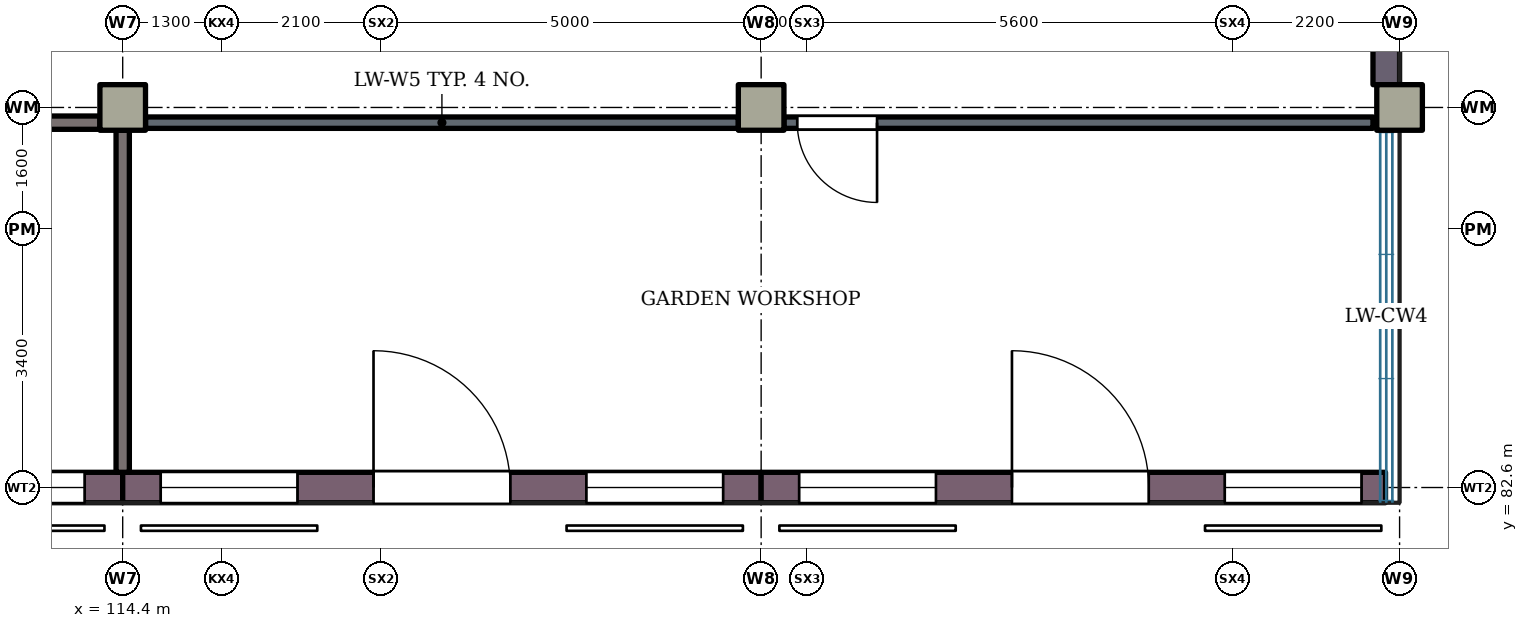
"""IFC4 building model, lengths in metres.
Left out: names, types, materials, properties, quantities, classifications, styles, units other than length and angle.
Written with IfcOpenShell. Run it as: python <this file> out.ifc"""

import sys

from ifc_helpers import new_model, si_unit, direction, frame, frame_2d, origin, origin_2d, place, context, subcontext, project, spatial, rectangle, extrude, element, fill, save


model = new_model("IFC4")
c1 = context("Model", 3, precision=1e-05, world=origin(), true_north=direction((0.0, 1.0)))
c2 = subcontext(c1, "Body", "Model", "MODEL_VIEW")
j1 = project(units=[si_unit("LENGTHUNIT", "METRE"), si_unit("PLANEANGLEUNIT", "RADIAN")], contexts=[c1])
p1 = place(None, origin())
s1 = spatial("IfcSite", under=j1, at=p1, CompositionType="ELEMENT")
p2 = place(p1, origin())
s2 = spatial("IfcBuilding", under=s1, at=p2, CompositionType="ELEMENT")
p3 = place(p2, frame((0.0, 0.0, 12.6)))
s3 = spatial("IfcBuildingStorey", under=s2, at=p3, CompositionType="ELEMENT", Elevation=12.6)
for number, where, z_axis, x_axis in (
    (1, (114.4, 87.6, 0.0), (0.0, 0.0, 1.0), (1.0, 0.0, 0.0)),
    (2, (122.8, 87.6, 0.0), (0.0, 0.0, 1.0), (1.0, 0.0, 0.0)),
    (3, (131.2, 87.6, 0.0), (0.0, 0.0, 1.0), (1.0, 0.0, 0.0)),
):
    element("IfcColumn", number, at=place(p3, frame(where, z_axis=z_axis, x_axis=x_axis)), inside=s3, PredefinedType="COLUMN", context=c2, shape_type="SweptSolid", body=[
        extrude(rectangle(XDim=0.6, YDim=0.6, at=origin_2d()), origin(), (0.0, 0.0, 1.0), 4.2),
    ])
p4 = place(p3, frame((131.025, 97.5, 0.0), z_axis=(0.0, 0.0, 1.0), x_axis=(0.0, -1.0, 0.0)))
e4 = element("IfcWall", 4, at=p4, inside=s3, PredefinedType="SHEAR", context=c2, shape_type="SweptSolid", body=[
    extrude(rectangle(XDim=9.6, YDim=0.35, at=frame_2d((4.8, 0.0))), origin(), (0.0, 0.0, 1.0), 4.2),
])
p5 = place(p3, frame((106.0, 82.6, 0.0), z_axis=(0.0, 0.0, 1.0), x_axis=(1.0, 0.0, 0.0)))
e5 = element("IfcWall", 5, at=p5, inside=s3, PredefinedType="SOLIDWALL", context=c2, shape_type="SweptSolid", body=[
    extrude(rectangle(XDim=8.4, YDim=0.4, at=frame_2d((4.2, 0.0))), origin(), (0.0, 0.0, 1.0), 3.32),
])
p6 = place(p5, frame((3.3, 0.0, 0.0)))
e6 = element("IfcOpeningElement", 6, at=p6, cuts=e5, PredefinedType="OPENING", context=c2, shape_type="SweptSolid", body=[
    extrude(rectangle(XDim=1.8, YDim=2.4, at=frame_2d((0.9, 1.2))), frame((0.0, 0.21, 0.0), z_axis=(0.0, -1.0, 0.0), x_axis=(1.0, 0.0, 0.0)), (0.0, 0.0, 1.0), 0.42),
])
p7 = place(p5, frame((0.5, 0.0, 0.9)))
e7 = element("IfcOpeningElement", 7, at=p7, cuts=e5, PredefinedType="OPENING", context=c2, shape_type="SweptSolid", body=[
    extrude(rectangle(XDim=1.8, YDim=1.9, at=frame_2d((0.9, 0.95))), frame((0.0, 0.21, 0.0), z_axis=(0.0, -1.0, 0.0), x_axis=(1.0, 0.0, 0.0)), (0.0, 0.0, 1.0), 0.42),
])
p8 = place(p5, frame((6.1, 0.0, 0.9)))
e8 = element("IfcOpeningElement", 8, at=p8, cuts=e5, PredefinedType="OPENING", context=c2, shape_type="SweptSolid", body=[
    extrude(rectangle(XDim=1.8, YDim=1.9, at=frame_2d((0.9, 0.95))), frame((0.0, 0.21, 0.0), z_axis=(0.0, -1.0, 0.0), x_axis=(1.0, 0.0, 0.0)), (0.0, 0.0, 1.0), 0.42),
])
p9 = place(p3, frame((114.4, 82.6, 0.0), z_axis=(0.0, 0.0, 1.0), x_axis=(1.0, 0.0, 0.0)))
e9 = element("IfcWall", 9, at=p9, inside=s3, PredefinedType="SOLIDWALL", context=c2, shape_type="SweptSolid", body=[
    extrude(rectangle(XDim=8.4, YDim=0.4, at=frame_2d((4.2, 0.0))), origin(), (0.0, 0.0, 1.0), 3.32),
])
p10 = place(p9, frame((3.3, 0.0, 0.0)))
e10 = element("IfcOpeningElement", 10, at=p10, cuts=e9, PredefinedType="OPENING", context=c2, shape_type="SweptSolid", body=[
    extrude(rectangle(XDim=1.8, YDim=2.4, at=frame_2d((0.9, 1.2))), frame((0.0, 0.21, 0.0), z_axis=(0.0, -1.0, 0.0), x_axis=(1.0, 0.0, 0.0)), (0.0, 0.0, 1.0), 0.42),
])
p11 = place(p9, frame((0.5, 0.0, 0.9)))
e11 = element("IfcOpeningElement", 11, at=p11, cuts=e9, PredefinedType="OPENING", context=c2, shape_type="SweptSolid", body=[
    extrude(rectangle(XDim=1.8, YDim=1.9, at=frame_2d((0.9, 0.95))), frame((0.0, 0.21, 0.0), z_axis=(0.0, -1.0, 0.0), x_axis=(1.0, 0.0, 0.0)), (0.0, 0.0, 1.0), 0.42),
])
p12 = place(p9, frame((6.1, 0.0, 0.9)))
e12 = element("IfcOpeningElement", 12, at=p12, cuts=e9, PredefinedType="OPENING", context=c2, shape_type="SweptSolid", body=[
    extrude(rectangle(XDim=1.8, YDim=1.9, at=frame_2d((0.9, 0.95))), frame((0.0, 0.21, 0.0), z_axis=(0.0, -1.0, 0.0), x_axis=(1.0, 0.0, 0.0)), (0.0, 0.0, 1.0), 0.42),
])
p13 = place(p3, frame((122.8, 82.6, 0.0), z_axis=(0.0, 0.0, 1.0), x_axis=(1.0, 0.0, 0.0)))
e13 = element("IfcWall", 13, at=p13, inside=s3, PredefinedType="SOLIDWALL", context=c2, shape_type="SweptSolid", body=[
    extrude(rectangle(XDim=8.215, YDim=0.4, at=frame_2d((4.107, 0.0))), origin(), (0.0, 0.0, 1.0), 3.32),
])
p14 = place(p13, frame((3.3, 0.0, 0.0)))
e14 = element("IfcOpeningElement", 14, at=p14, cuts=e13, PredefinedType="OPENING", context=c2, shape_type="SweptSolid", body=[
    extrude(rectangle(XDim=1.8, YDim=2.4, at=frame_2d((0.9, 1.2))), frame((0.0, 0.21, 0.0), z_axis=(0.0, -1.0, 0.0), x_axis=(1.0, 0.0, 0.0)), (0.0, 0.0, 1.0), 0.42),
])
p15 = place(p13, frame((0.5, 0.0, 0.9)))
e15 = element("IfcOpeningElement", 15, at=p15, cuts=e13, PredefinedType="OPENING", context=c2, shape_type="SweptSolid", body=[
    extrude(rectangle(XDim=1.8, YDim=1.9, at=frame_2d((0.9, 0.95))), frame((0.0, 0.21, 0.0), z_axis=(0.0, -1.0, 0.0), x_axis=(1.0, 0.0, 0.0)), (0.0, 0.0, 1.0), 0.42),
])
p16 = place(p13, frame((6.1, 0.0, 0.9)))
e16 = element("IfcOpeningElement", 16, at=p16, cuts=e13, PredefinedType="OPENING", context=c2, shape_type="SweptSolid", body=[
    extrude(rectangle(XDim=1.8, YDim=1.9, at=frame_2d((0.9, 0.95))), frame((0.0, 0.21, 0.0), z_axis=(0.0, -1.0, 0.0), x_axis=(1.0, 0.0, 0.0)), (0.0, 0.0, 1.0), 0.42),
])
p17 = place(p3, frame((106.3, 87.4, 0.0), z_axis=(0.0, 0.0, 1.0), x_axis=(1.0, 0.0, 0.0)))
e17 = element("IfcWall", 17, at=p17, inside=s3, PredefinedType="PARTITIONING", context=c2, shape_type="SweptSolid", body=[
    extrude(rectangle(XDim=7.8, YDim=0.175, at=frame_2d((3.9, 0.0))), origin(), (0.0, 0.0, 1.0), 3.12),
])
p18 = place(p17, frame((0.1, 0.0, 0.0)))
e18 = element("IfcOpeningElement", 18, at=p18, cuts=e17, PredefinedType="OPENING", context=c2, shape_type="SweptSolid", body=[
    extrude(rectangle(XDim=1.0, YDim=2.1, at=frame_2d((0.5, 1.05))), frame((0.0, 0.097, 0.0), z_axis=(0.0, -1.0, 0.0), x_axis=(1.0, 0.0, 0.0)), (0.0, 0.0, 1.0), 0.195),
])
p19 = place(p3, frame((114.7, 87.4, 0.0), z_axis=(0.0, 0.0, 1.0), x_axis=(1.0, 0.0, 0.0)))
e19 = element("IfcWall", 19, at=p19, inside=s3, PredefinedType="PARTITIONING", context=c2, shape_type="SweptSolid", body=[
    extrude(rectangle(XDim=7.8, YDim=0.15, at=frame_2d((3.9, 0.0))), origin(), (0.0, 0.0, 1.0), 3.12),
])
p20 = place(p3, frame((123.1, 87.4, 0.0), z_axis=(0.0, 0.0, 1.0), x_axis=(1.0, 0.0, 0.0)))
e20 = element("IfcWall", 20, at=p20, inside=s3, PredefinedType="PARTITIONING", context=c2, shape_type="SweptSolid", body=[
    extrude(rectangle(XDim=7.75, YDim=0.15, at=frame_2d((3.875, 0.0))), origin(), (0.0, 0.0, 1.0), 3.12),
])
p21 = place(p20, frame((0.175, 0.0, 0.0)))
e21 = element("IfcOpeningElement", 21, at=p21, cuts=e20, PredefinedType="OPENING", context=c2, shape_type="SweptSolid", body=[
    extrude(rectangle(XDim=1.05, YDim=2.1, at=frame_2d((0.525, 1.05))), frame((0.0, 0.085, 0.0), z_axis=(0.0, -1.0, 0.0), x_axis=(1.0, 0.0, 0.0)), (0.0, 0.0, 1.0), 0.17),
])
p22 = place(p3, frame((114.4, 82.8, 0.0), z_axis=(0.0, 0.0, 1.0), x_axis=(0.0, 1.0, 0.0)))
e22 = element("IfcWall", 22, at=p22, inside=s3, PredefinedType="PARTITIONING", context=c2, shape_type="SweptSolid", body=[
    extrude(rectangle(XDim=4.5, YDim=0.175, at=frame_2d((2.25, 0.0))), origin(), (0.0, 0.0, 1.0), 3.02),
])
p23 = place(p8, origin())
e23 = element("IfcWindow", 23, at=p23, inside=s3, PartitioningType="SINGLE_PANEL", PredefinedType="WINDOW", context=c2, shape_type="SweptSolid", body=[
    extrude(rectangle(XDim=1.8, YDim=1.9, at=frame_2d((0.9, 0.95))), frame((0.0, 0.03, 0.0), z_axis=(0.0, -1.0, 0.0), x_axis=(1.0, 0.0, 0.0)), (0.0, 0.0, 1.0), 0.06),
])
fill(e8, e23)
p24 = place(p10, origin())
e24 = element("IfcDoor", 24, at=p24, inside=s3, OperationType="DOUBLE_DOOR_SINGLE_SWING", PredefinedType="DOOR", context=c2, shape_type="SweptSolid", body=[
    extrude(rectangle(XDim=1.8, YDim=2.4, at=frame_2d((0.9, 1.2))), frame((0.0, 0.025, 0.0), z_axis=(0.0, -1.0, 0.0), x_axis=(1.0, 0.0, 0.0)), (0.0, 0.0, 1.0), 0.05),
])
fill(e10, e24)
p25 = place(p11, origin())
e25 = element("IfcWindow", 25, at=p25, inside=s3, PartitioningType="SINGLE_PANEL", PredefinedType="WINDOW", context=c2, shape_type="SweptSolid", body=[
    extrude(rectangle(XDim=1.8, YDim=1.9, at=frame_2d((0.9, 0.95))), frame((0.0, 0.03, 0.0), z_axis=(0.0, -1.0, 0.0), x_axis=(1.0, 0.0, 0.0)), (0.0, 0.0, 1.0), 0.06),
])
fill(e11, e25)
p26 = place(p12, origin())
e26 = element("IfcWindow", 26, at=p26, inside=s3, PartitioningType="SINGLE_PANEL", PredefinedType="WINDOW", context=c2, shape_type="SweptSolid", body=[
    extrude(rectangle(XDim=1.8, YDim=1.9, at=frame_2d((0.9, 0.95))), frame((0.0, 0.03, 0.0), z_axis=(0.0, -1.0, 0.0), x_axis=(1.0, 0.0, 0.0)), (0.0, 0.0, 1.0), 0.06),
])
fill(e12, e26)
p27 = place(p14, origin())
e27 = element("IfcDoor", 27, at=p27, inside=s3, OperationType="DOUBLE_DOOR_SINGLE_SWING", PredefinedType="DOOR", context=c2, shape_type="SweptSolid", body=[
    extrude(rectangle(XDim=1.8, YDim=2.4, at=frame_2d((0.9, 1.2))), frame((0.0, 0.025, 0.0), z_axis=(0.0, -1.0, 0.0), x_axis=(1.0, 0.0, 0.0)), (0.0, 0.0, 1.0), 0.05),
])
fill(e14, e27)
p28 = place(p15, origin())
e28 = element("IfcWindow", 28, at=p28, inside=s3, PartitioningType="SINGLE_PANEL", PredefinedType="WINDOW", context=c2, shape_type="SweptSolid", body=[
    extrude(rectangle(XDim=1.8, YDim=1.9, at=frame_2d((0.9, 0.95))), frame((0.0, 0.03, 0.0), z_axis=(0.0, -1.0, 0.0), x_axis=(1.0, 0.0, 0.0)), (0.0, 0.0, 1.0), 0.06),
])
fill(e15, e28)
p29 = place(p16, origin())
e29 = element("IfcWindow", 29, at=p29, inside=s3, PartitioningType="SINGLE_PANEL", PredefinedType="WINDOW", context=c2, shape_type="SweptSolid", body=[
    extrude(rectangle(XDim=1.8, YDim=1.9, at=frame_2d((0.9, 0.95))), frame((0.0, 0.03, 0.0), z_axis=(0.0, -1.0, 0.0), x_axis=(1.0, 0.0, 0.0)), (0.0, 0.0, 1.0), 0.06),
])
fill(e16, e29)
p30 = place(p21, origin())
e30 = element("IfcDoor", 30, at=p30, inside=s3, OperationType="SINGLE_SWING_RIGHT", PredefinedType="DOOR", context=c2, shape_type="SweptSolid", body=[
    extrude(rectangle(XDim=1.05, YDim=2.1, at=frame_2d((0.525, 1.05))), frame((0.0, 0.025, 0.0), z_axis=(0.0, -1.0, 0.0), x_axis=(1.0, 0.0, 0.0)), (0.0, 0.0, 1.0), 0.05),
])
fill(e21, e30)
save(model, sys.argv[1])
